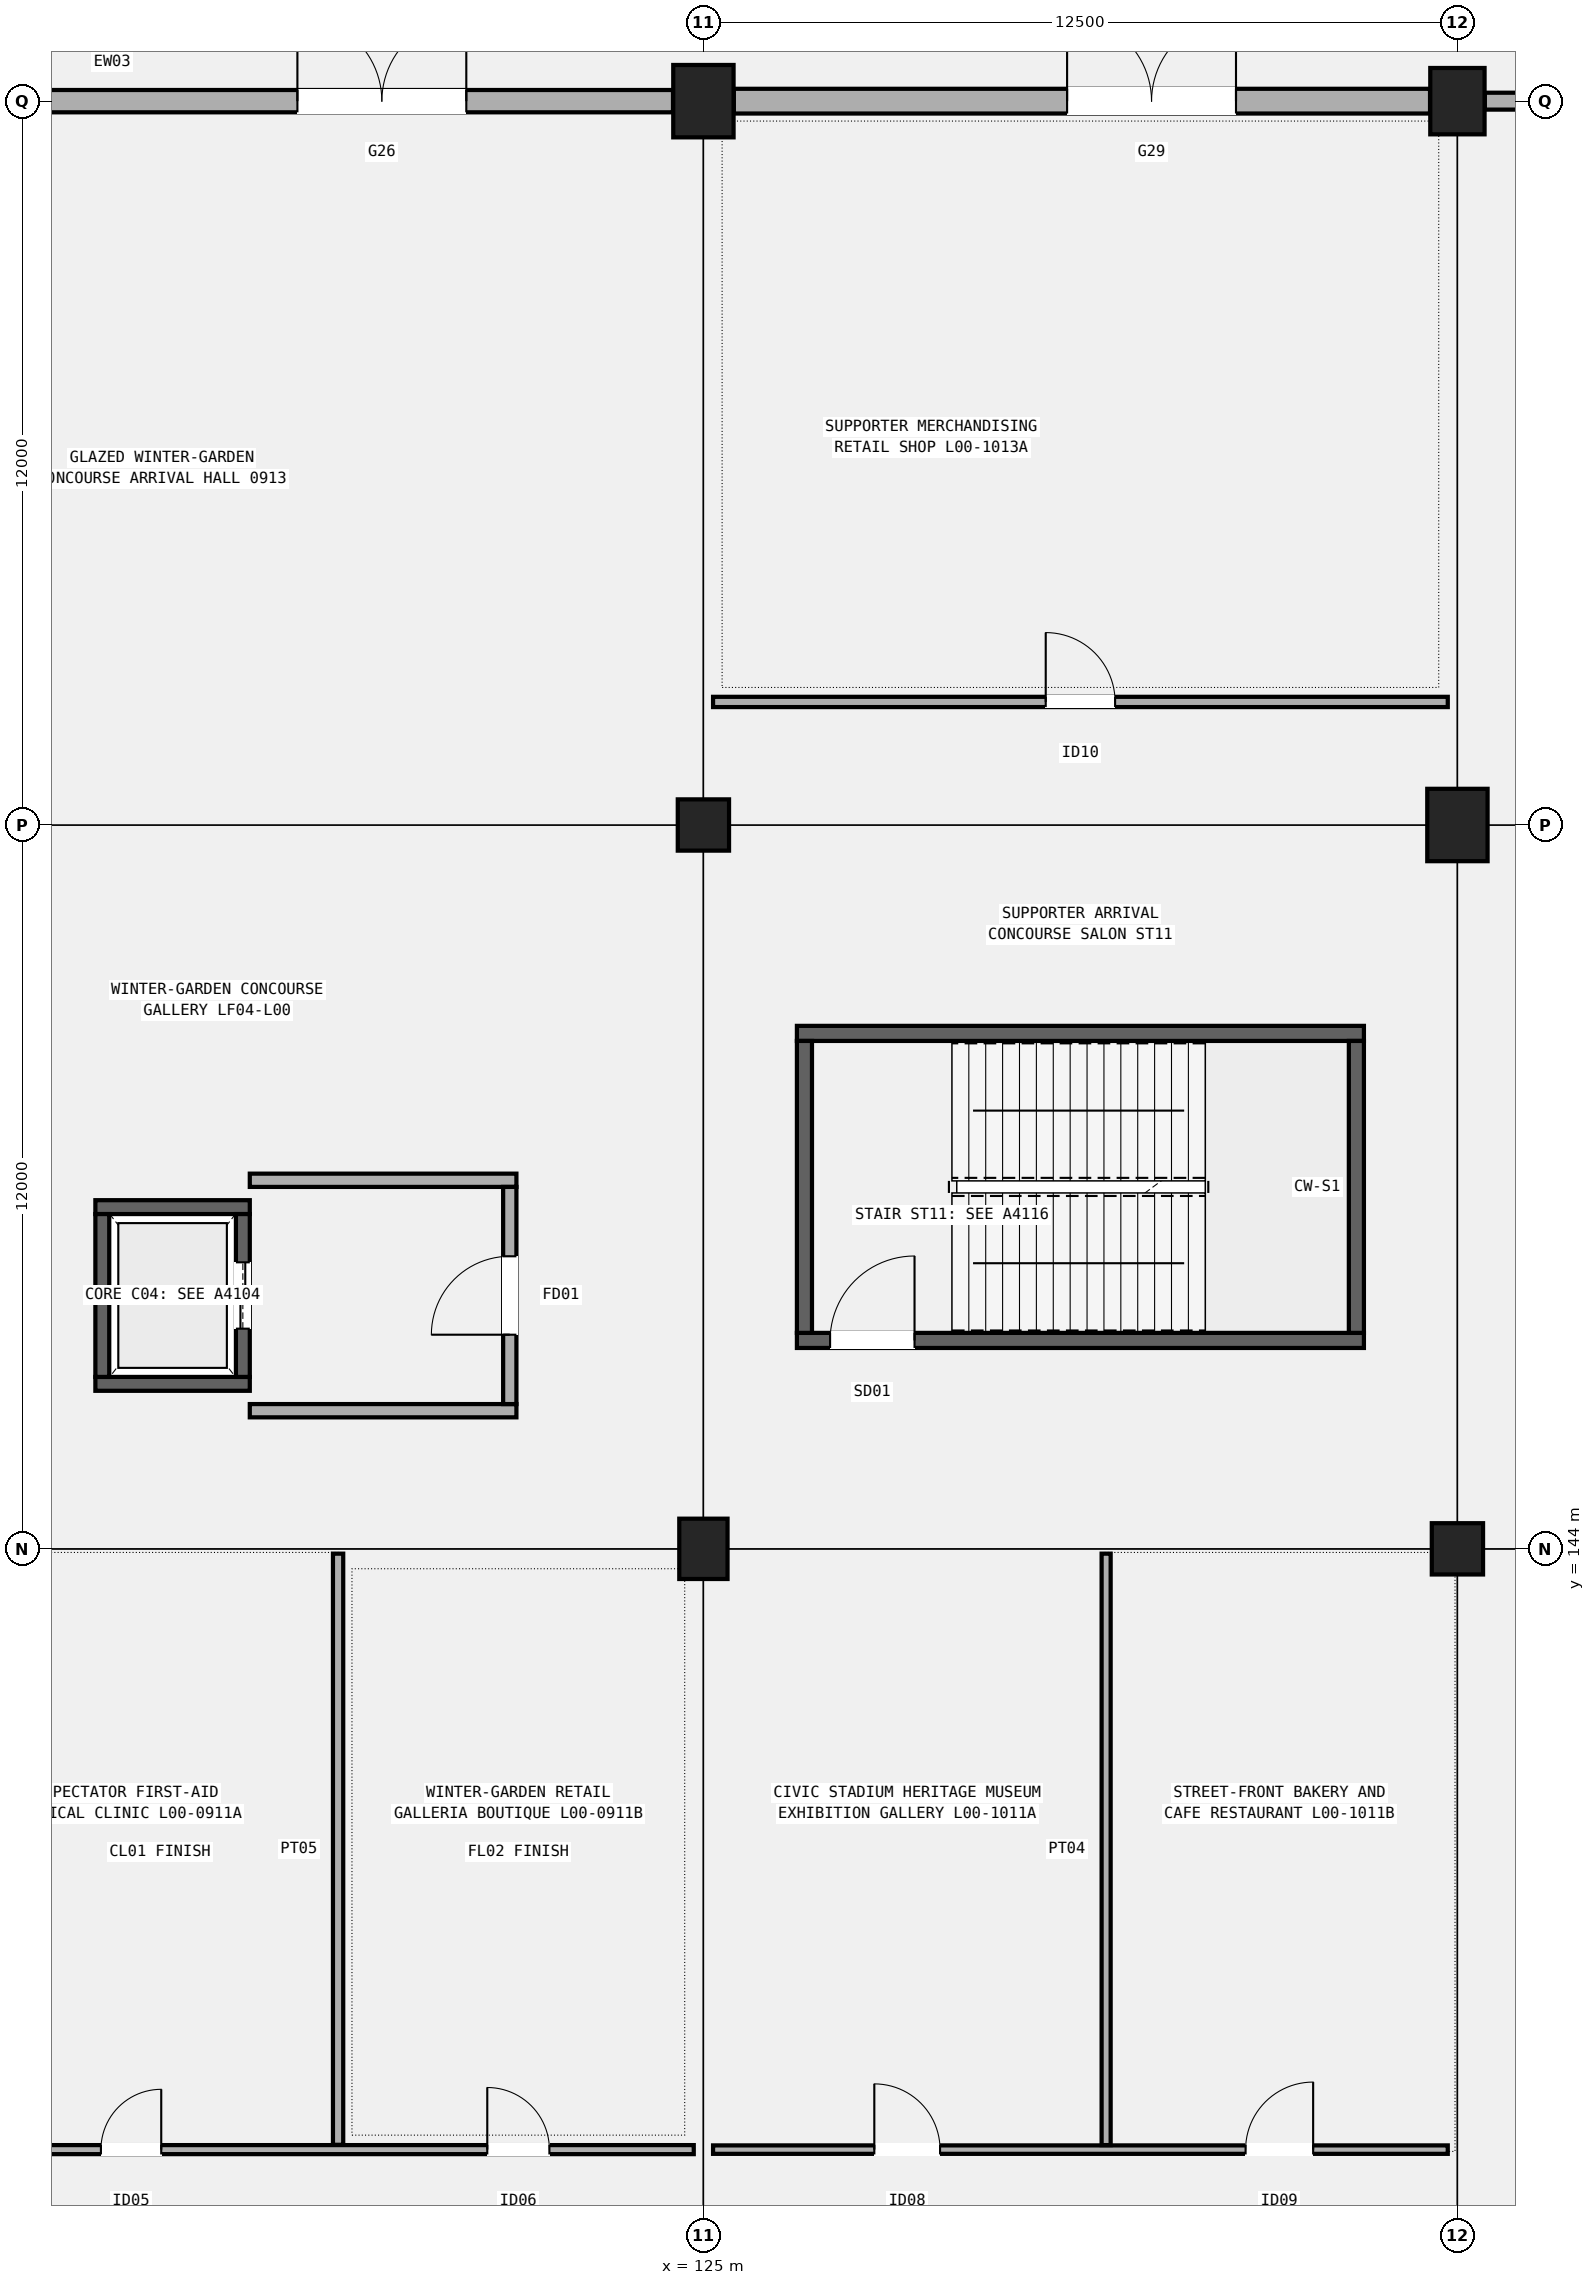
"""IFC4 building model, lengths in metres.
Left out: names, types, materials, properties, quantities, classifications, styles, units other than length and angle.
Written with IfcOpenShell. Run it as: python <this file> out.ifc"""

import sys

from ifc_helpers import new_model, si_unit, direction, frame, frame_2d, origin, origin_2d, place, context, subcontext, project, spatial, rectangle, circle, extrude, element, fill, save


model = new_model("IFC4")
c1 = context("Model", 3, precision=1e-05, world=origin(), true_north=direction((0.0, 1.0)))
c2 = subcontext(c1, "Body", "Model", "MODEL_VIEW")
j1 = project(units=[si_unit("LENGTHUNIT", "METRE"), si_unit("PLANEANGLEUNIT", "RADIAN")], contexts=[c1])
p1 = place(None, origin())
s1 = spatial("IfcSite", under=j1, at=p1, CompositionType="ELEMENT")
p2 = place(p1, origin())
s2 = spatial("IfcBuilding", under=s1, at=p2, CompositionType="ELEMENT")
p3 = place(p2, origin())
s3 = spatial("IfcBuildingStorey", under=s2, at=p3, CompositionType="ELEMENT", Elevation=0.0)
p4 = place(p3, frame((125.0, 144.0, 0.0), z_axis=(0.0, 0.0, 1.0), x_axis=(1.0, 0.0, 0.0)))
e1 = element("IfcColumn", 1, at=p4, inside=s3, PredefinedType="COLUMN", context=c2, shape_type="SweptSolid", body=[
    extrude(rectangle(XDim=0.8, YDim=1.0, at=origin_2d()), origin(), (0.0, 0.0, 1.0), 5.4),
])
p5 = place(p3, frame((125.0, 156.0, 0.0), z_axis=(0.0, 0.0, 1.0), x_axis=(1.0, 0.0, 0.0)))
e2 = element("IfcColumn", 2, at=p5, inside=s3, PredefinedType="COLUMN", context=c2, shape_type="SweptSolid", body=[
    extrude(circle(Radius=0.425, at=origin_2d()), origin(), (0.0, 0.0, 1.0), 5.4),
])
p6 = place(p3, frame((125.0, 168.0, 0.0), z_axis=(0.0, 0.0, 1.0), x_axis=(1.0, 0.0, 0.0)))
e3 = element("IfcColumn", 3, at=p6, inside=s3, PredefinedType="COLUMN", context=c2, shape_type="SweptSolid", body=[
    extrude(rectangle(XDim=1.0, YDim=1.2, at=origin_2d()), origin(), (0.0, 0.0, 1.0), 5.4),
])
p7 = place(p3, frame((137.5, 144.0, 0.0), z_axis=(0.0, 0.0, 1.0), x_axis=(1.0, 0.0, 0.0)))
e4 = element("IfcColumn", 4, at=p7, inside=s3, PredefinedType="COLUMN", context=c2, shape_type="SweptSolid", body=[
    extrude(circle(Radius=0.425, at=origin_2d()), origin(), (0.0, 0.0, 1.0), 5.4),
])
p8 = place(p3, frame((137.5, 156.0, 0.0), z_axis=(0.0, 0.0, 1.0), x_axis=(1.0, 0.0, 0.0)))
e5 = element("IfcColumn", 5, at=p8, inside=s3, PredefinedType="COLUMN", context=c2, shape_type="SweptSolid", body=[
    extrude(rectangle(XDim=1.0, YDim=1.2, at=origin_2d()), origin(), (0.0, 0.0, 1.0), 5.4),
])
p9 = place(p3, frame((137.5, 168.0, 0.0), z_axis=(0.0, 0.0, 1.0), x_axis=(1.0, 0.0, 0.0)))
e6 = element("IfcColumn", 6, at=p9, inside=s3, PredefinedType="COLUMN", context=c2, shape_type="SweptSolid", body=[
    extrude(rectangle(XDim=0.9, YDim=1.1, at=origin_2d()), origin(), (0.0, 0.0, 1.0), 5.4),
])
p10 = place(p3, frame((112.429, 168.0, 0.0), z_axis=(0.0, 0.0, 1.0), x_axis=(1.0, 0.0, 0.0)))
e7 = element("IfcWall", 7, at=p10, inside=s3, PredefinedType="SOLIDWALL", context=c2, shape_type="SweptSolid", body=[
    extrude(rectangle(XDim=12.067, YDim=0.37, at=frame_2d((6.034, 0.0))), origin(), (0.0, 0.0, 1.0), 4.34),
])
p11 = place(p10, frame((5.84, 0.0, 0.0)))
e8 = element("IfcOpeningElement", 8, at=p11, cuts=e7, PredefinedType="OPENING", context=c2, shape_type="SweptSolid", body=[
    extrude(rectangle(XDim=2.8, YDim=2.4, at=frame_2d((1.4, 1.2))), frame((0.0, 0.195, 0.0), z_axis=(0.0, -1.0, 0.0), x_axis=(1.0, 0.0, 0.0)), (0.0, 0.0, 1.0), 0.39),
])
p12 = place(p3, frame((125.504, 168.0, 0.0), z_axis=(0.0, 0.0, 1.0), x_axis=(1.0, 0.0, 0.0)))
e9 = element("IfcWall", 9, at=p12, inside=s3, PredefinedType="SOLIDWALL", context=c2, shape_type="SweptSolid", body=[
    extrude(rectangle(XDim=11.542, YDim=0.41, at=frame_2d((5.771, 0.0))), origin(), (0.0, 0.0, 1.0), 4.09),
])
p13 = place(p12, frame((5.525, 0.0, 0.0)))
e10 = element("IfcOpeningElement", 10, at=p13, cuts=e9, PredefinedType="OPENING", context=c2, shape_type="SweptSolid", body=[
    extrude(rectangle(XDim=2.8, YDim=2.4, at=frame_2d((1.4, 1.2))), frame((0.0, 0.215, 0.0), z_axis=(0.0, -1.0, 0.0), x_axis=(1.0, 0.0, 0.0)), (0.0, 0.0, 1.0), 0.43),
])
p14 = place(p3, frame((137.954, 168.0, 0.0), z_axis=(0.0, 0.0, 1.0), x_axis=(1.0, 0.0, 0.0)))
e11 = element("IfcWall", 11, at=p14, inside=s3, PredefinedType="SOLIDWALL", context=c2, shape_type="SweptSolid", body=[
    extrude(rectangle(XDim=11.642, YDim=0.28, at=frame_2d((5.821, 0.0))), origin(), (0.0, 0.0, 1.0), 4.24),
])
p15 = place(p14, frame((5.585, 0.0, 0.0)))
e12 = element("IfcOpeningElement", 12, at=p15, cuts=e11, PredefinedType="OPENING", context=c2, shape_type="SweptSolid", body=[
    extrude(rectangle(XDim=2.8, YDim=2.4, at=frame_2d((1.4, 1.2))), frame((0.0, 0.15, 0.0), z_axis=(0.0, -1.0, 0.0), x_axis=(1.0, 0.0, 0.0)), (0.0, 0.0, 1.0), 0.3),
])
p16 = place(p3, frame((126.55, 147.455, 0.0), z_axis=(0.0, 0.0, 1.0), x_axis=(1.0, 0.0, 0.0)))
e13 = element("IfcWall", 13, at=p16, inside=s3, PredefinedType="SHEAR", context=c2, shape_type="SweptSolid", body=[
    extrude(rectangle(XDim=9.4, YDim=0.25, at=frame_2d((4.7, 0.0))), origin(), (0.0, 0.0, 1.0), 5.14),
])
p17 = place(p16, frame((0.55, 0.0, 0.0)))
e14 = element("IfcOpeningElement", 14, at=p17, cuts=e13, PredefinedType="OPENING", context=c2, shape_type="SweptSolid", body=[
    extrude(rectangle(XDim=1.4, YDim=2.15, at=frame_2d((0.7, 1.075))), frame((0.0, 0.135, 0.0), z_axis=(0.0, -1.0, 0.0), x_axis=(1.0, 0.0, 0.0)), (0.0, 0.0, 1.0), 0.27),
])
p18 = place(p3, frame((126.55, 152.545, 0.0), z_axis=(0.0, 0.0, 1.0), x_axis=(1.0, 0.0, 0.0)))
e15 = element("IfcWall", 15, at=p18, inside=s3, PredefinedType="SHEAR", context=c2, shape_type="SweptSolid", body=[
    extrude(rectangle(XDim=9.4, YDim=0.25, at=frame_2d((4.7, 0.0))), origin(), (0.0, 0.0, 1.0), 5.14),
])
for number, where, z_axis, x_axis in (
    (16, (126.675, 147.58, 0.0), (0.0, 0.0, 1.0), (0.0, 1.0, 0.0)),
    (17, (135.825, 147.58, 0.0), (0.0, 0.0, 1.0), (0.0, 1.0, 0.0)),
):
    element("IfcWall", number, at=place(p3, frame(where, z_axis=z_axis, x_axis=x_axis)), inside=s3, PredefinedType="SHEAR", context=c2, shape_type="SweptSolid", body=[
        extrude(rectangle(XDim=4.84, YDim=0.25, at=frame_2d((2.42, 0.0))), origin(), (0.0, 0.0, 1.0), 5.14),
    ])
for number, where, z_axis, x_axis in (
    (18, (114.92, 146.735, 0.0), (0.0, 0.0, 1.0), (1.0, 0.0, 0.0)),
    (19, (114.92, 149.665, 0.0), (0.0, 0.0, 1.0), (1.0, 0.0, 0.0)),
):
    element("IfcWall", number, at=place(p3, frame(where, z_axis=z_axis, x_axis=x_axis)), inside=s3, PredefinedType="SHEAR", context=c2, shape_type="SweptSolid", body=[
        extrude(rectangle(XDim=2.56, YDim=0.23, at=frame_2d((1.28, 0.0))), origin(), (0.0, 0.0, 1.0), 5.14),
    ])
p19 = place(p3, frame((115.035, 146.85, 0.0), z_axis=(0.0, 0.0, 1.0), x_axis=(0.0, 1.0, 0.0)))
e20 = element("IfcWall", 20, at=p19, inside=s3, PredefinedType="SHEAR", context=c2, shape_type="SweptSolid", body=[
    extrude(rectangle(XDim=2.7, YDim=0.23, at=frame_2d((1.35, 0.0))), origin(), (0.0, 0.0, 1.0), 5.14),
])
p20 = place(p3, frame((117.365, 146.85, 0.0), z_axis=(0.0, 0.0, 1.0), x_axis=(0.0, 1.0, 0.0)))
e21 = element("IfcWall", 21, at=p20, inside=s3, PredefinedType="SHEAR", context=c2, shape_type="SweptSolid", body=[
    extrude(rectangle(XDim=2.7, YDim=0.23, at=frame_2d((1.35, 0.0))), origin(), (0.0, 0.0, 1.0), 5.14),
])
p21 = place(p20, frame((0.8, 0.0, 0.0)))
e22 = element("IfcOpeningElement", 22, at=p21, cuts=e21, PredefinedType="OPENING", context=c2, shape_type="SweptSolid", body=[
    extrude(rectangle(XDim=1.1, YDim=2.15, at=frame_2d((0.55, 1.075))), frame((0.0, 0.125, 0.0), z_axis=(0.0, -1.0, 0.0), x_axis=(1.0, 0.0, 0.0)), (0.0, 0.0, 1.0), 0.25),
])
for number, where, z_axis, x_axis in (
    (23, (117.48, 146.29, 0.0), (0.0, 0.0, 1.0), (1.0, 0.0, 0.0)),
    (24, (117.48, 150.11, 0.0), (0.0, 0.0, 1.0), (1.0, 0.0, 0.0)),
):
    element("IfcWall", number, at=place(p3, frame(where, z_axis=z_axis, x_axis=x_axis)), inside=s3, PredefinedType="SOLIDWALL", context=c2, shape_type="SweptSolid", body=[
        extrude(rectangle(XDim=4.42, YDim=0.22, at=frame_2d((2.21, 0.0))), origin(), (0.0, 0.0, 1.0), 4.52),
    ])
p22 = place(p3, frame((121.79, 146.4, 0.0), z_axis=(0.0, 0.0, 1.0), x_axis=(0.0, 1.0, 0.0)))
e25 = element("IfcWall", 25, at=p22, inside=s3, PredefinedType="SOLIDWALL", context=c2, shape_type="SweptSolid", body=[
    extrude(rectangle(XDim=3.6, YDim=0.22, at=frame_2d((1.8, 0.0))), origin(), (0.0, 0.0, 1.0), 4.52),
])
p23 = place(p22, frame((1.15, 0.0, 0.0)))
e26 = element("IfcOpeningElement", 26, at=p23, cuts=e25, PredefinedType="OPENING", context=c2, shape_type="SweptSolid", body=[
    extrude(rectangle(XDim=1.3, YDim=2.15, at=frame_2d((0.65, 1.075))), frame((0.0, 0.12, 0.0), z_axis=(0.0, -1.0, 0.0), x_axis=(1.0, 0.0, 0.0)), (0.0, 0.0, 1.0), 0.24),
])
p24 = place(p3, frame((112.16, 134.04, 0.0), z_axis=(0.0, 0.0, 1.0), x_axis=(1.0, 0.0, 0.0)))
e27 = element("IfcWall", 27, at=p24, inside=s3, PredefinedType="PARTITIONING", context=c2, shape_type="SweptSolid", body=[
    extrude(rectangle(XDim=12.68, YDim=0.15, at=frame_2d((6.34, 0.0))), origin(), (0.0, 0.0, 1.0), 4.52),
])
p25 = place(p24, frame((2.852, 0.0, 0.0)))
e28 = element("IfcOpeningElement", 28, at=p25, cuts=e27, PredefinedType="OPENING", context=c2, shape_type="SweptSolid", body=[
    extrude(rectangle(XDim=1.0, YDim=2.14, at=frame_2d((0.5, 1.07))), frame((0.0, 0.085, 0.0), z_axis=(0.0, -1.0, 0.0), x_axis=(1.0, 0.0, 0.0)), (0.0, 0.0, 1.0), 0.17),
])
p26 = place(p24, frame((9.257, 0.0, 0.0)))
e29 = element("IfcOpeningElement", 29, at=p26, cuts=e27, PredefinedType="OPENING", context=c2, shape_type="SweptSolid", body=[
    extrude(rectangle(XDim=1.03, YDim=2.12, at=frame_2d((0.515, 1.06))), frame((0.0, 0.085, 0.0), z_axis=(0.0, -1.0, 0.0), x_axis=(1.0, 0.0, 0.0)), (0.0, 0.0, 1.0), 0.17),
])
p27 = place(p3, frame((118.944, 134.12, 0.0), z_axis=(0.0, 0.0, 1.0), x_axis=(0.0, 1.0, 0.0)))
e30 = element("IfcWall", 30, at=p27, inside=s3, PredefinedType="PARTITIONING", context=c2, shape_type="SweptSolid", body=[
    extrude(rectangle(XDim=9.8, YDim=0.17, at=frame_2d((4.9, 0.0))), origin(), (0.0, 0.0, 1.0), 4.52),
])
p28 = place(p3, frame((125.16, 134.04, 0.0), z_axis=(0.0, 0.0, 1.0), x_axis=(1.0, 0.0, 0.0)))
e31 = element("IfcWall", 31, at=p28, inside=s3, PredefinedType="PARTITIONING", context=c2, shape_type="SweptSolid", body=[
    extrude(rectangle(XDim=12.18, YDim=0.14, at=frame_2d((6.09, 0.0))), origin(), (0.0, 0.0, 1.0), 4.52),
])
p29 = place(p28, frame((2.673, 0.0, 0.0)))
e32 = element("IfcOpeningElement", 32, at=p29, cuts=e31, PredefinedType="OPENING", context=c2, shape_type="SweptSolid", body=[
    extrude(rectangle(XDim=1.09, YDim=2.16, at=frame_2d((0.545, 1.08))), frame((0.0, 0.08, 0.0), z_axis=(0.0, -1.0, 0.0), x_axis=(1.0, 0.0, 0.0)), (0.0, 0.0, 1.0), 0.16),
])
p30 = place(p28, frame((8.828, 0.0, 0.0)))
e33 = element("IfcOpeningElement", 33, at=p30, cuts=e31, PredefinedType="OPENING", context=c2, shape_type="SweptSolid", body=[
    extrude(rectangle(XDim=1.12, YDim=2.18, at=frame_2d((0.56, 1.09))), frame((0.0, 0.08, 0.0), z_axis=(0.0, -1.0, 0.0), x_axis=(1.0, 0.0, 0.0)), (0.0, 0.0, 1.0), 0.16),
])
p31 = place(p3, frame((131.676, 134.115, 0.0), z_axis=(0.0, 0.0, 1.0), x_axis=(0.0, 1.0, 0.0)))
e34 = element("IfcWall", 34, at=p31, inside=s3, PredefinedType="PARTITIONING", context=c2, shape_type="SweptSolid", body=[
    extrude(rectangle(XDim=9.805, YDim=0.15, at=frame_2d((4.902, 0.0))), origin(), (0.0, 0.0, 1.0), 4.52),
])
p32 = place(p3, frame((125.16, 158.04, 0.0), z_axis=(0.0, 0.0, 1.0), x_axis=(1.0, 0.0, 0.0)))
e35 = element("IfcWall", 35, at=p32, inside=s3, PredefinedType="PARTITIONING", context=c2, shape_type="SweptSolid", body=[
    extrude(rectangle(XDim=12.18, YDim=0.17, at=frame_2d((6.09, 0.0))), origin(), (0.0, 0.0, 1.0), 4.52),
])
p33 = place(p32, frame((5.515, 0.0, 0.0)))
e36 = element("IfcOpeningElement", 36, at=p33, cuts=e35, PredefinedType="OPENING", context=c2, shape_type="SweptSolid", body=[
    extrude(rectangle(XDim=1.15, YDim=2.15, at=frame_2d((0.575, 1.075))), frame((0.0, 0.095, 0.0), z_axis=(0.0, -1.0, 0.0), x_axis=(1.0, 0.0, 0.0)), (0.0, 0.0, 1.0), 0.19),
])
p34 = place(p11, origin())
e37 = element("IfcDoor", 37, at=p34, inside=s3, OperationType="DOUBLE_DOOR_SINGLE_SWING", PredefinedType="DOOR", context=c2, shape_type="SweptSolid", body=[
    extrude(rectangle(XDim=2.8, YDim=2.4, at=frame_2d((1.4, 1.2))), frame((0.0, 0.025, 0.0), z_axis=(0.0, -1.0, 0.0), x_axis=(1.0, 0.0, 0.0)), (0.0, 0.0, 1.0), 0.05),
])
fill(e8, e37)
p35 = place(p13, origin())
e38 = element("IfcDoor", 38, at=p35, inside=s3, OperationType="DOUBLE_DOOR_SINGLE_SWING", PredefinedType="DOOR", context=c2, shape_type="SweptSolid", body=[
    extrude(rectangle(XDim=2.8, YDim=2.4, at=frame_2d((1.4, 1.2))), frame((0.0, 0.025, 0.0), z_axis=(0.0, -1.0, 0.0), x_axis=(1.0, 0.0, 0.0)), (0.0, 0.0, 1.0), 0.05),
])
fill(e10, e38)
p36 = place(p17, origin())
e39 = element("IfcDoor", 39, at=p36, inside=s3, OperationType="SINGLE_SWING_RIGHT", PredefinedType="DOOR", context=c2, shape_type="SweptSolid", body=[
    extrude(rectangle(XDim=1.4, YDim=2.15, at=frame_2d((0.7, 1.075))), frame((0.0, 0.025, 0.0), z_axis=(0.0, -1.0, 0.0), x_axis=(1.0, 0.0, 0.0)), (0.0, 0.0, 1.0), 0.05),
])
fill(e14, e39)
p37 = place(p21, origin())
e40 = element("IfcDoor", 40, at=p37, inside=s3, OperationType="DOUBLE_DOOR_SLIDING", PredefinedType="DOOR", context=c2, shape_type="SweptSolid", body=[
    extrude(rectangle(XDim=1.1, YDim=2.15, at=frame_2d((0.55, 1.075))), frame((0.0, 0.025, 0.0), z_axis=(0.0, -1.0, 0.0), x_axis=(1.0, 0.0, 0.0)), (0.0, 0.0, 1.0), 0.05),
])
fill(e22, e40)
p38 = place(p23, origin())
e41 = element("IfcDoor", 41, at=p38, inside=s3, OperationType="SINGLE_SWING_LEFT", PredefinedType="DOOR", context=c2, shape_type="SweptSolid", body=[
    extrude(rectangle(XDim=1.3, YDim=2.15, at=frame_2d((0.65, 1.075))), frame((0.0, 0.025, 0.0), z_axis=(0.0, -1.0, 0.0), x_axis=(1.0, 0.0, 0.0)), (0.0, 0.0, 1.0), 0.05),
])
fill(e26, e41)
p39 = place(p25, origin())
e42 = element("IfcDoor", 42, at=p39, inside=s3, OperationType="SINGLE_SWING_RIGHT", PredefinedType="DOOR", context=c2, shape_type="SweptSolid", body=[
    extrude(rectangle(XDim=1.0, YDim=2.14, at=frame_2d((0.5, 1.07))), frame((0.0, 0.025, 0.0), z_axis=(0.0, -1.0, 0.0), x_axis=(1.0, 0.0, 0.0)), (0.0, 0.0, 1.0), 0.05),
])
fill(e28, e42)
p40 = place(p26, origin())
e43 = element("IfcDoor", 43, at=p40, inside=s3, OperationType="SINGLE_SWING_LEFT", PredefinedType="DOOR", context=c2, shape_type="SweptSolid", body=[
    extrude(rectangle(XDim=1.03, YDim=2.12, at=frame_2d((0.515, 1.06))), frame((0.0, 0.025, 0.0), z_axis=(0.0, -1.0, 0.0), x_axis=(1.0, 0.0, 0.0)), (0.0, 0.0, 1.0), 0.05),
])
fill(e29, e43)
p41 = place(p29, origin())
e44 = element("IfcDoor", 44, at=p41, inside=s3, OperationType="SINGLE_SWING_LEFT", PredefinedType="DOOR", context=c2, shape_type="SweptSolid", body=[
    extrude(rectangle(XDim=1.09, YDim=2.16, at=frame_2d((0.545, 1.08))), frame((0.0, 0.025, 0.0), z_axis=(0.0, -1.0, 0.0), x_axis=(1.0, 0.0, 0.0)), (0.0, 0.0, 1.0), 0.05),
])
fill(e32, e44)
p42 = place(p30, origin())
e45 = element("IfcDoor", 45, at=p42, inside=s3, OperationType="SINGLE_SWING_RIGHT", PredefinedType="DOOR", context=c2, shape_type="SweptSolid", body=[
    extrude(rectangle(XDim=1.12, YDim=2.18, at=frame_2d((0.56, 1.09))), frame((0.0, 0.025, 0.0), z_axis=(0.0, -1.0, 0.0), x_axis=(1.0, 0.0, 0.0)), (0.0, 0.0, 1.0), 0.05),
])
fill(e33, e45)
p43 = place(p33, origin())
e46 = element("IfcDoor", 46, at=p43, inside=s3, OperationType="SINGLE_SWING_LEFT", PredefinedType="DOOR", context=c2, shape_type="SweptSolid", body=[
    extrude(rectangle(XDim=1.15, YDim=2.15, at=frame_2d((0.575, 1.075))), frame((0.0, 0.025, 0.0), z_axis=(0.0, -1.0, 0.0), x_axis=(1.0, 0.0, 0.0)), (0.0, 0.0, 1.0), 0.05),
])
fill(e36, e46)
save(model, sys.argv[1])
